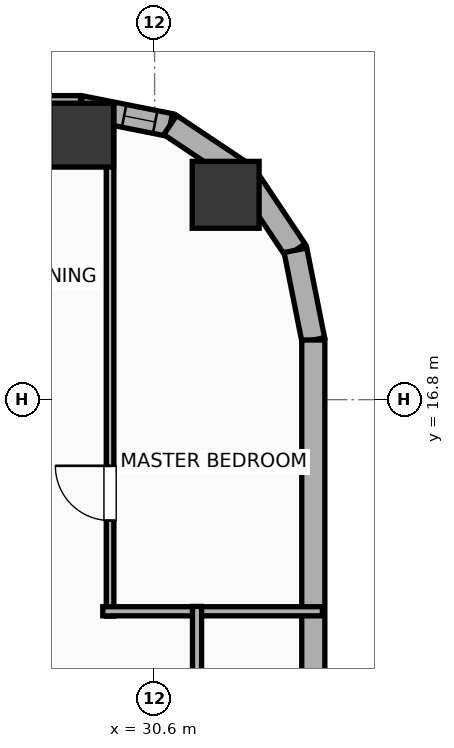
"""IFC4 building model, lengths in metres.
Left out: names, types, materials, properties, quantities, classifications, styles, units other than length and angle.
Written with IfcOpenShell. Run it as: python <this file> out.ifc"""

import sys

from ifc_helpers import new_model, si_unit, direction, frame, frame_2d, origin, origin_2d, place, context, subcontext, project, spatial, rectangle, hollow_rectangle, hollow_circle, extrude, element, fill, save


model = new_model("IFC4")
c1 = context("Model", 3, precision=1e-05, world=origin(), true_north=direction((0.0, 1.0)))
c2 = subcontext(c1, "Body", "Model", "MODEL_VIEW")
j1 = project(units=[si_unit("LENGTHUNIT", "METRE"), si_unit("PLANEANGLEUNIT", "RADIAN")], contexts=[c1])
p1 = place(None, origin())
s1 = spatial("IfcSite", under=j1, at=p1, CompositionType="ELEMENT")
p2 = place(p1, origin())
s2 = spatial("IfcBuilding", under=s1, at=p2, CompositionType="ELEMENT")
p3 = place(p2, frame((0.0, 0.0, 101.4)))
s3 = spatial("IfcBuildingStorey", under=s2, at=p3, CompositionType="ELEMENT", Elevation=101.4)
p4 = place(p3, frame((31.769, 20.169, 0.0), z_axis=(0.0, 0.0, 1.0), x_axis=(1.0, 0.0, 0.0)))
e1 = element("IfcColumn", 1, at=p4, inside=s3, PredefinedType="COLUMN", context=c2, shape_type="SweptSolid", body=[
    extrude(hollow_circle(Radius=0.55, WallThickness=0.036, at=origin_2d()), origin(), (0.0, 0.0, 1.0), 3.9),
])
p5 = place(p3, frame((29.4, 21.15, 0.0), z_axis=(0.0, 0.0, 1.0), x_axis=(1.0, 0.0, 0.0)))
e2 = element("IfcColumn", 2, at=p5, inside=s3, PredefinedType="COLUMN", context=c2, shape_type="SweptSolid", body=[
    extrude(hollow_rectangle(XDim=1.05, YDim=1.05, WallThickness=0.036, at=origin_2d()), origin(), (0.0, 0.0, 1.0), 3.9),
])
p6 = place(p3, frame((-25.381, 21.61, 0.0), z_axis=(0.0, 0.0, 1.0), x_axis=(1.0, 0.0, 0.0)))
e3 = element("IfcWall", 3, at=p6, inside=s3, PredefinedType="ELEMENTEDWALL", context=c2, shape_type="SweptSolid", body=[
    extrude(rectangle(XDim=54.763, YDim=0.38, at=frame_2d((27.381, 0.0))), origin(), (0.0, 0.0, 1.0), 3.65),
])
p7 = place(p6, frame((45.067, 0.0, 0.75)))
e4 = element("IfcOpeningElement", 4, at=p7, cuts=e3, PredefinedType="OPENING", context=c2, shape_type="SweptSolid", body=[
    extrude(rectangle(XDim=2.4, YDim=2.1, at=frame_2d((1.2, 1.05))), frame((0.0, 0.2, 0.0), z_axis=(0.0, -1.0, 0.0), x_axis=(1.0, 0.0, 0.0)), (0.0, 0.0, 1.0), 0.4),
])
p8 = place(p6, frame((4.076, 0.0, 0.75)))
e5 = element("IfcOpeningElement", 5, at=p8, cuts=e3, PredefinedType="OPENING", context=c2, shape_type="SweptSolid", body=[
    extrude(rectangle(XDim=1.2, YDim=2.05, at=frame_2d((0.6, 1.025))), frame((0.0, 0.2, 0.0), z_axis=(0.0, -1.0, 0.0), x_axis=(1.0, 0.0, 0.0)), (0.0, 0.0, 1.0), 0.4),
])
p9 = place(p6, frame((9.395, 0.0, 0.75)))
e6 = element("IfcOpeningElement", 6, at=p9, cuts=e3, PredefinedType="OPENING", context=c2, shape_type="SweptSolid", body=[
    extrude(rectangle(XDim=0.85, YDim=2.05, at=frame_2d((0.425, 1.025))), frame((0.0, 0.2, 0.0), z_axis=(0.0, -1.0, 0.0), x_axis=(1.0, 0.0, 0.0)), (0.0, 0.0, 1.0), 0.4),
])
p10 = place(p6, frame((7.205, 0.0, 0.75)))
e7 = element("IfcOpeningElement", 7, at=p10, cuts=e3, PredefinedType="OPENING", context=c2, shape_type="SweptSolid", body=[
    extrude(rectangle(XDim=1.2, YDim=2.05, at=frame_2d((0.6, 1.025))), frame((0.0, 0.2, 0.0), z_axis=(0.0, -1.0, 0.0), x_axis=(1.0, 0.0, 0.0)), (0.0, 0.0, 1.0), 0.4),
])
p11 = place(p6, frame((13.676, 0.0, 0.75)))
e8 = element("IfcOpeningElement", 8, at=p11, cuts=e3, PredefinedType="OPENING", context=c2, shape_type="SweptSolid", body=[
    extrude(rectangle(XDim=1.2, YDim=2.05, at=frame_2d((0.6, 1.025))), frame((0.0, 0.2, 0.0), z_axis=(0.0, -1.0, 0.0), x_axis=(1.0, 0.0, 0.0)), (0.0, 0.0, 1.0), 0.4),
])
p12 = place(p6, frame((17.136, 0.0, 0.75)))
e9 = element("IfcOpeningElement", 9, at=p12, cuts=e3, PredefinedType="OPENING", context=c2, shape_type="SweptSolid", body=[
    extrude(rectangle(XDim=1.2, YDim=2.05, at=frame_2d((0.6, 1.025))), frame((0.0, 0.2, 0.0), z_axis=(0.0, -1.0, 0.0), x_axis=(1.0, 0.0, 0.0)), (0.0, 0.0, 1.0), 0.4),
])
p13 = place(p6, frame((22.656, 0.0, 0.75)))
e10 = element("IfcOpeningElement", 10, at=p13, cuts=e3, PredefinedType="OPENING", context=c2, shape_type="SweptSolid", body=[
    extrude(rectangle(XDim=1.2, YDim=2.05, at=frame_2d((0.6, 1.025))), frame((0.0, 0.2, 0.0), z_axis=(0.0, -1.0, 0.0), x_axis=(1.0, 0.0, 0.0)), (0.0, 0.0, 1.0), 0.4),
])
p14 = place(p6, frame((29.443, 0.0, 0.75)))
e11 = element("IfcOpeningElement", 11, at=p14, cuts=e3, PredefinedType="OPENING", context=c2, shape_type="SweptSolid", body=[
    extrude(rectangle(XDim=1.2, YDim=2.05, at=frame_2d((0.6, 1.025))), frame((0.0, 0.2, 0.0), z_axis=(0.0, -1.0, 0.0), x_axis=(1.0, 0.0, 0.0)), (0.0, 0.0, 1.0), 0.4),
])
p15 = place(p6, frame((26.348, 0.0, 0.75)))
e12 = element("IfcOpeningElement", 12, at=p15, cuts=e3, PredefinedType="OPENING", context=c2, shape_type="SweptSolid", body=[
    extrude(rectangle(XDim=1.2, YDim=2.05, at=frame_2d((0.6, 1.025))), frame((0.0, 0.2, 0.0), z_axis=(0.0, -1.0, 0.0), x_axis=(1.0, 0.0, 0.0)), (0.0, 0.0, 1.0), 0.4),
])
p16 = place(p6, frame((33.596, 0.0, 0.75)))
e13 = element("IfcOpeningElement", 13, at=p16, cuts=e3, PredefinedType="OPENING", context=c2, shape_type="SweptSolid", body=[
    extrude(rectangle(XDim=1.2, YDim=2.05, at=frame_2d((0.6, 1.025))), frame((0.0, 0.2, 0.0), z_axis=(0.0, -1.0, 0.0), x_axis=(1.0, 0.0, 0.0)), (0.0, 0.0, 1.0), 0.4),
])
p17 = place(p6, frame((36.014, 0.0, 0.75)))
e14 = element("IfcOpeningElement", 14, at=p17, cuts=e3, PredefinedType="OPENING", context=c2, shape_type="SweptSolid", body=[
    extrude(rectangle(XDim=1.2, YDim=2.05, at=frame_2d((0.6, 1.025))), frame((0.0, 0.2, 0.0), z_axis=(0.0, -1.0, 0.0), x_axis=(1.0, 0.0, 0.0)), (0.0, 0.0, 1.0), 0.4),
])
p18 = place(p6, frame((40.814, 0.0, 0.75)))
e15 = element("IfcOpeningElement", 15, at=p18, cuts=e3, PredefinedType="OPENING", context=c2, shape_type="SweptSolid", body=[
    extrude(rectangle(XDim=1.2, YDim=2.05, at=frame_2d((0.6, 1.025))), frame((0.0, 0.2, 0.0), z_axis=(0.0, -1.0, 0.0), x_axis=(1.0, 0.0, 0.0)), (0.0, 0.0, 1.0), 0.4),
])
p19 = place(p6, frame((49.385, 0.0, 0.75)))
e16 = element("IfcOpeningElement", 16, at=p19, cuts=e3, PredefinedType="OPENING", context=c2, shape_type="SweptSolid", body=[
    extrude(rectangle(XDim=1.2, YDim=2.05, at=frame_2d((0.6, 1.025))), frame((0.0, 0.2, 0.0), z_axis=(0.0, -1.0, 0.0), x_axis=(1.0, 0.0, 0.0)), (0.0, 0.0, 1.0), 0.4),
])
p20 = place(p6, frame((52.181, 0.0, 0.75)))
e17 = element("IfcOpeningElement", 17, at=p20, cuts=e3, PredefinedType="OPENING", context=c2, shape_type="SweptSolid", body=[
    extrude(rectangle(XDim=1.2, YDim=2.05, at=frame_2d((0.6, 1.025))), frame((0.0, 0.2, 0.0), z_axis=(0.0, -1.0, 0.0), x_axis=(1.0, 0.0, 0.0)), (0.0, 0.0, 1.0), 0.4),
])
p21 = place(p3, frame((29.381, 21.61, 0.0), z_axis=(0.0, 0.0, 1.0), x_axis=(0.980755066645, -0.195242155415, 0.0)))
e18 = element("IfcWall", 18, at=p21, inside=s3, PredefinedType="ELEMENTEDWALL", context=c2, shape_type="SweptSolid", body=[
    extrude(rectangle(XDim=1.504, YDim=0.38, at=frame_2d((0.752, 0.0))), origin(), (0.0, 0.0, 1.0), 3.65),
])
p22 = place(p21, frame((0.732, 0.0, 0.75)))
e19 = element("IfcOpeningElement", 19, at=p22, cuts=e18, PredefinedType="OPENING", context=c2, shape_type="SweptSolid", body=[
    extrude(rectangle(XDim=0.52, YDim=2.05, at=frame_2d((0.26, 1.025))), frame((0.0, 0.2, 0.0), z_axis=(0.0, -1.0, 0.0), x_axis=(1.0, 0.0, 0.0)), (0.0, 0.0, 1.0), 0.4),
])
p23 = place(p3, frame((30.857, 21.316, 0.0), z_axis=(0.0, 0.0, 1.0), x_axis=(0.831468045563, -0.555572577804, 0.0)))
e20 = element("IfcWall", 20, at=p23, inside=s3, PredefinedType="ELEMENTEDWALL", context=c2, shape_type="SweptSolid", body=[
    extrude(rectangle(XDim=1.485, YDim=0.38, at=frame_2d((0.742, 0.0))), origin(), (0.0, 0.0, 1.0), 3.65),
])
p24 = place(p3, frame((32.091, 20.491, 0.0), z_axis=(0.0, 0.0, 1.0), x_axis=(0.555610286119, -0.831442848281, 0.0)))
e21 = element("IfcWall", 21, at=p24, inside=s3, PredefinedType="ELEMENTEDWALL", context=c2, shape_type="SweptSolid", body=[
    extrude(rectangle(XDim=1.485, YDim=0.38, at=frame_2d((0.743, 0.0))), origin(), (0.0, 0.0, 1.0), 3.65),
])
p25 = place(p3, frame((32.917, 19.257, 0.0), z_axis=(0.0, 0.0, 1.0), x_axis=(0.195086038585, -0.980786132421, 0.0)))
e22 = element("IfcWall", 22, at=p25, inside=s3, PredefinedType="ELEMENTEDWALL", context=c2, shape_type="SweptSolid", body=[
    extrude(rectangle(XDim=1.504, YDim=0.38, at=frame_2d((0.752, 0.0))), origin(), (0.0, 0.0, 1.0), 3.65),
])
p26 = place(p3, frame((33.21, 17.781, 0.0), z_axis=(0.0, 0.0, 1.0), x_axis=(0.0, -1.0, 0.0)))
e23 = element("IfcWall", 23, at=p26, inside=s3, PredefinedType="ELEMENTEDWALL", context=c2, shape_type="SweptSolid", body=[
    extrude(rectangle(XDim=34.363, YDim=0.38, at=frame_2d((17.181, 0.0))), origin(), (0.0, 0.0, 1.0), 3.65),
])
p27 = place(p26, frame((12.836, 0.0, 0.75)))
e24 = element("IfcOpeningElement", 24, at=p27, cuts=e23, PredefinedType="OPENING", context=c2, shape_type="SweptSolid", body=[
    extrude(rectangle(XDim=1.2, YDim=2.05, at=frame_2d((0.6, 1.025))), frame((0.0, 0.2, 0.0), z_axis=(0.0, -1.0, 0.0), x_axis=(1.0, 0.0, 0.0)), (0.0, 0.0, 1.0), 0.4),
])
p28 = place(p26, frame((21.386, 0.0, 0.75)))
e25 = element("IfcOpeningElement", 25, at=p28, cuts=e23, PredefinedType="OPENING", context=c2, shape_type="SweptSolid", body=[
    extrude(rectangle(XDim=1.2, YDim=2.05, at=frame_2d((0.6, 1.025))), frame((0.0, 0.2, 0.0), z_axis=(0.0, -1.0, 0.0), x_axis=(1.0, 0.0, 0.0)), (0.0, 0.0, 1.0), 0.4),
])
p29 = place(p3, frame((29.868, 13.24, 0.0), z_axis=(0.0, 0.0, 1.0), x_axis=(0.0, 1.0, 0.0)))
e26 = element("IfcWall", 26, at=p29, inside=s3, PredefinedType="PARTITIONING", context=c2, shape_type="SweptSolid", body=[
    extrude(rectangle(XDim=8.426, YDim=0.125, at=frame_2d((4.213, 0.0))), origin(), (0.0, 0.0, 1.0), 3.65),
])
p30 = place(p29, frame((1.572, 0.0, 0.0)))
e27 = element("IfcOpeningElement", 27, at=p30, cuts=e26, PredefinedType="OPENING", context=c2, shape_type="SweptSolid", body=[
    extrude(rectangle(XDim=0.9, YDim=2.05, at=frame_2d((0.45, 1.025))), frame((0.0, 0.073, 0.0), z_axis=(0.0, -1.0, 0.0), x_axis=(1.0, 0.0, 0.0)), (0.0, 0.0, 1.0), 0.145),
])
p31 = place(p3, frame((29.748, 13.32, 0.0), z_axis=(0.0, 0.0, 1.0), x_axis=(1.0, 0.0, 0.0)))
e28 = element("IfcWall", 28, at=p31, inside=s3, PredefinedType="PLUMBINGWALL", context=c2, shape_type="SweptSolid", body=[
    extrude(rectangle(XDim=3.612, YDim=0.15, at=frame_2d((1.806, 0.0))), origin(), (0.0, 0.0, 1.0), 3.65),
])
p32 = place(p3, frame((31.298, 10.08, 0.0), z_axis=(0.0, 0.0, 1.0), x_axis=(0.0, 1.0, 0.0)))
e29 = element("IfcWall", 29, at=p32, inside=s3, PredefinedType="PLUMBINGWALL", context=c2, shape_type="SweptSolid", body=[
    extrude(rectangle(XDim=3.32, YDim=0.15, at=frame_2d((1.66, 0.0))), origin(), (0.0, 0.0, 1.0), 3.65),
])
p33 = place(p32, frame((1.21, 0.0, 0.0)))
e30 = element("IfcOpeningElement", 30, at=p33, cuts=e29, PredefinedType="OPENING", context=c2, shape_type="SweptSolid", body=[
    extrude(rectangle(XDim=0.9, YDim=2.05, at=frame_2d((0.45, 1.025))), frame((0.0, 0.085, 0.0), z_axis=(0.0, -1.0, 0.0), x_axis=(1.0, 0.0, 0.0)), (0.0, 0.0, 1.0), 0.17),
])
p34 = place(p22, origin())
e31 = element("IfcWindow", 31, at=p34, inside=s3, PartitioningType="SINGLE_PANEL", PredefinedType="WINDOW", context=c2, shape_type="SweptSolid", body=[
    extrude(rectangle(XDim=0.52, YDim=2.05, at=frame_2d((0.26, 1.025))), frame((0.0, 0.03, 0.0), z_axis=(0.0, -1.0, 0.0), x_axis=(1.0, 0.0, 0.0)), (0.0, 0.0, 1.0), 0.06),
])
fill(e19, e31)
p35 = place(p30, origin())
e32 = element("IfcDoor", 32, at=p35, inside=s3, OperationType="SINGLE_SWING_RIGHT", PredefinedType="DOOR", context=c2, shape_type="SweptSolid", body=[
    extrude(rectangle(XDim=0.9, YDim=2.05, at=frame_2d((0.45, 1.025))), frame((0.0, 0.025, 0.0), z_axis=(0.0, -1.0, 0.0), x_axis=(1.0, 0.0, 0.0)), (0.0, 0.0, 1.0), 0.05),
])
fill(e27, e32)
save(model, sys.argv[1])
